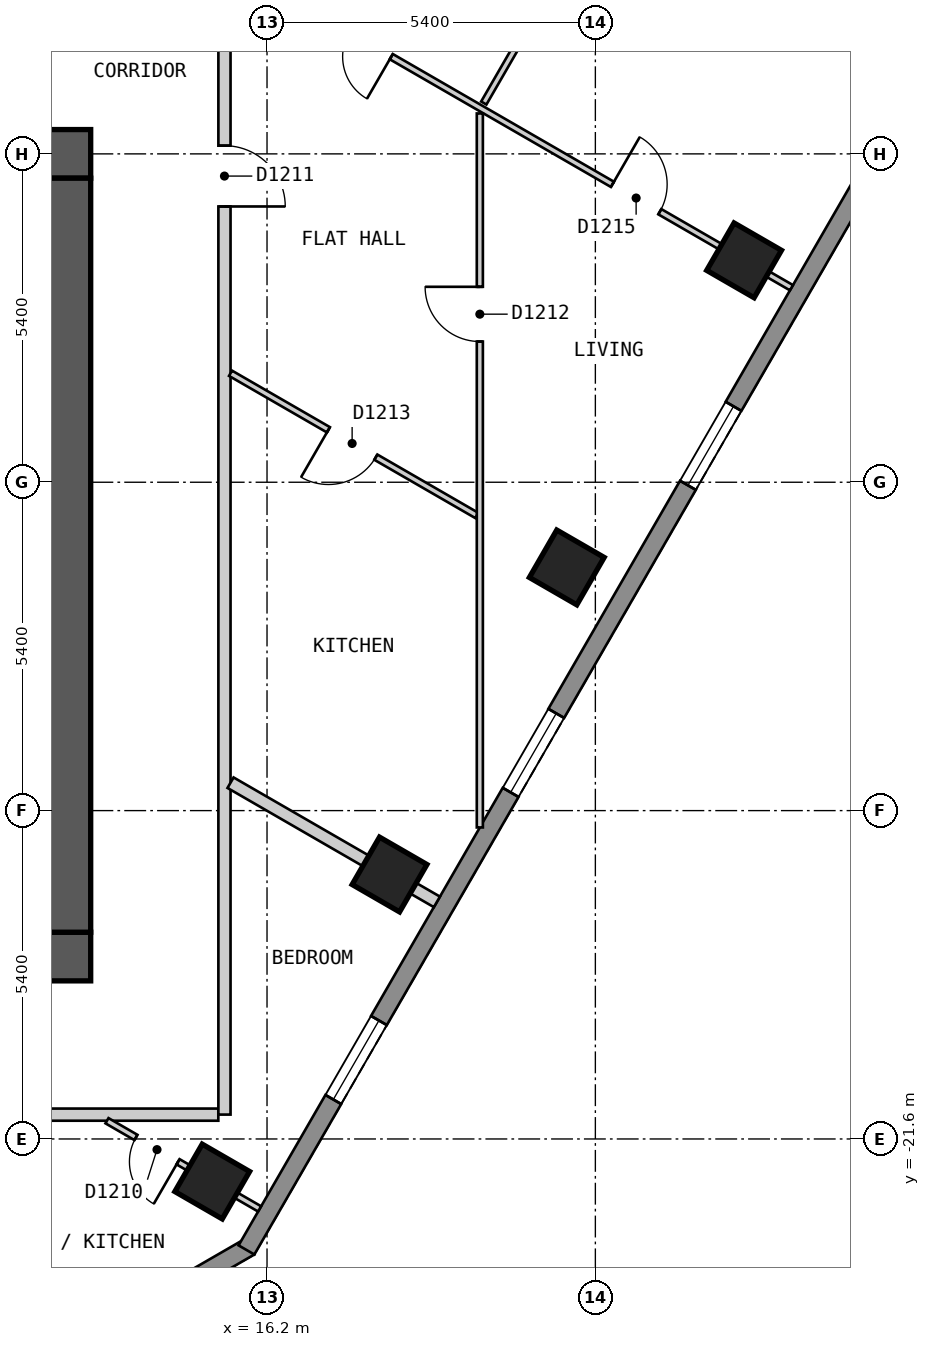
"""IFC4 building model, lengths in metres.
Left out: names, types, materials, properties, quantities, classifications, styles, units other than length and angle.
Written with IfcOpenShell. Run it as: python <this file> out.ifc"""

import sys

from ifc_helpers import new_model, si_unit, direction, frame, frame_2d, origin, origin_2d, place, context, subcontext, project, spatial, polyline, rectangle, outline, extrude, element, fill, save


model = new_model("IFC4")
c1 = context("Model", 3, precision=1e-05, world=origin(), true_north=direction((0.0, 1.0)))
c2 = subcontext(c1, "Body", "Model", "MODEL_VIEW")
j1 = project(units=[si_unit("LENGTHUNIT", "METRE"), si_unit("PLANEANGLEUNIT", "RADIAN")], contexts=[c1])
p1 = place(None, origin())
s1 = spatial("IfcSite", under=j1, at=p1, CompositionType="ELEMENT")
p2 = place(p1, origin())
s2 = spatial("IfcBuilding", under=s1, at=p2, CompositionType="ELEMENT")
p3 = place(p2, frame((0.0, 0.0, 129.6)))
s3 = spatial("IfcBuildingStorey", under=s2, at=p3, CompositionType="ELEMENT", Elevation=129.6)
for number, where, z_axis, x_axis in (
    (1, (15.299, -22.3, 0.0), (0.0, 0.0, 1.0), (0.5, 0.866, 0.0)),
    (2, (18.215, -17.251, 0.0), (0.0, 0.0, 1.0), (0.5, 0.866, 0.0)),
    (3, (21.13, -12.201, 0.0), (0.0, 0.0, 1.0), (0.5, 0.866, 0.0)),
    (4, (24.046, -7.151, 0.0), (0.0, 0.0, 1.0), (0.5, 0.866, 0.0)),
):
    element("IfcColumn", number, at=place(p3, frame(where, z_axis=z_axis, x_axis=x_axis)), inside=s3, PredefinedType="COLUMN", context=c2, shape_type="SweptSolid", body=[
        extrude(rectangle(XDim=0.9, YDim=0.9, at=origin_2d()), origin(), (0.0, 0.0, 1.0), 3.0),
    ])
p4 = place(p3, frame((-13.3, -18.6, 0.0), z_axis=(0.0, 0.0, 1.0), x_axis=(1.0, 0.0, 0.0)))
e5 = element("IfcWall", 5, at=p4, inside=s3, PredefinedType="SHEAR", context=c2, shape_type="SweptSolid", body=[
    extrude(rectangle(XDim=26.6, YDim=0.8, at=frame_2d((13.3, 0.0))), origin(), (0.0, 0.0, 1.0), 2.7),
])
p5 = place(p3, frame((-13.3, -5.4, 0.0), z_axis=(0.0, 0.0, 1.0), x_axis=(1.0, 0.0, 0.0)))
e6 = element("IfcWall", 6, at=p5, inside=s3, PredefinedType="SHEAR", context=c2, shape_type="SweptSolid", body=[
    extrude(rectangle(XDim=26.6, YDim=0.8, at=frame_2d((13.3, 0.0))), origin(), (0.0, 0.0, 1.0), 2.7),
])
p6 = place(p5, frame((23.65, 0.0, 0.0)))
e7 = element("IfcOpeningElement", 7, at=p6, cuts=e6, PredefinedType="OPENING", context=c2, shape_type="SweptSolid", body=[
    extrude(rectangle(XDim=1.2, YDim=2.1, at=frame_2d((0.6, 1.05))), frame((0.0, 0.41, 0.0), z_axis=(0.0, -1.0, 0.0), x_axis=(1.0, 0.0, 0.0)), (0.0, 0.0, 1.0), 0.82),
])
p7 = place(p3, frame((12.9, -18.2, 0.0), z_axis=(0.0, 0.0, 1.0), x_axis=(0.0, 1.0, 0.0)))
e8 = element("IfcWall", 8, at=p7, inside=s3, PredefinedType="SHEAR", context=c2, shape_type="SweptSolid", body=[
    extrude(rectangle(XDim=12.4, YDim=0.8, at=frame_2d((6.2, 0.0))), origin(), (0.0, 0.0, 1.0), 2.7),
])
p8 = place(p3, frame((11.587, -25.87, 0.0), z_axis=(0.0, 0.0, 1.0), x_axis=(0.866022959057, 0.500004234368, 0.0)))
e9 = element("IfcWall", 9, at=p8, inside=s3, PredefinedType="SOLIDWALL", context=c2, shape_type="SweptSolid", body=[
    extrude(outline(polyline([(0.0, -0.15), (5.0, -0.15), (4.92, 0.15), (0.08, 0.15), (0.0, -0.15)])), origin(), (0.0, 0.0, 1.0), 2.7),
])
p9 = place(p8, frame((0.65, 0.0, 0.15)))
e10 = element("IfcOpeningElement", 10, at=p9, cuts=e9, PredefinedType="OPENING", context=c2, shape_type="SweptSolid", body=[
    extrude(rectangle(XDim=1.2, YDim=2.1, at=frame_2d((0.6, 1.05))), frame((0.0, 0.16, 0.0), z_axis=(0.0, -1.0, 0.0), x_axis=(1.0, 0.0, 0.0)), (0.0, 0.0, 1.0), 0.32),
])
p10 = place(p3, frame((15.862, -23.425, 0.0), z_axis=(0.0, 0.0, 1.0), x_axis=(0.500017503135, 0.866015298109, 0.0)))
e11 = element("IfcWall", 11, at=p10, inside=s3, PredefinedType="SOLIDWALL", context=c2, shape_type="SweptSolid", body=[
    extrude(outline(polyline([(0.0, -0.15), (24.711, -0.15), (24.631, 0.15), (0.08, 0.15), (0.0, -0.15)])), origin(), (0.0, 0.0, 1.0), 2.7),
])
p11 = place(p10, frame((2.857, 0.0, 0.15)))
e12 = element("IfcOpeningElement", 12, at=p11, cuts=e11, PredefinedType="OPENING", context=c2, shape_type="SweptSolid", body=[
    extrude(rectangle(XDim=1.5, YDim=2.1, at=frame_2d((0.75, 1.05))), frame((0.0, 0.16, 0.0), z_axis=(0.0, -1.0, 0.0), x_axis=(1.0, 0.0, 0.0)), (0.0, 0.0, 1.0), 0.32),
])
p12 = place(p10, frame((8.689, 0.0, 0.15)))
e13 = element("IfcOpeningElement", 13, at=p12, cuts=e11, PredefinedType="OPENING", context=c2, shape_type="SweptSolid", body=[
    extrude(rectangle(XDim=1.5, YDim=2.1, at=frame_2d((0.75, 1.05))), frame((0.0, 0.16, 0.0), z_axis=(0.0, -1.0, 0.0), x_axis=(1.0, 0.0, 0.0)), (0.0, 0.0, 1.0), 0.32),
])
p13 = place(p10, frame((14.52, 0.0, 0.15)))
e14 = element("IfcOpeningElement", 14, at=p13, cuts=e11, PredefinedType="OPENING", context=c2, shape_type="SweptSolid", body=[
    extrude(rectangle(XDim=1.5, YDim=2.1, at=frame_2d((0.75, 1.05))), frame((0.0, 0.16, 0.0), z_axis=(0.0, -1.0, 0.0), x_axis=(1.0, 0.0, 0.0)), (0.0, 0.0, 1.0), 0.32),
])
p14 = place(p10, frame((20.351, 0.0, 0.15)))
e15 = element("IfcOpeningElement", 15, at=p14, cuts=e11, PredefinedType="OPENING", context=c2, shape_type="SweptSolid", body=[
    extrude(rectangle(XDim=1.5, YDim=2.1, at=frame_2d((0.75, 1.05))), frame((0.0, 0.16, 0.0), z_axis=(0.0, -1.0, 0.0), x_axis=(1.0, 0.0, 0.0)), (0.0, 0.0, 1.0), 0.32),
])
p15 = place(p3, frame((-15.499, -21.2, 0.0), z_axis=(0.0, 0.0, 1.0), x_axis=(1.0, 0.0, 0.0)))
e16 = element("IfcWall", 16, at=p15, inside=s3, PredefinedType="PARTITIONING", context=c2, shape_type="SweptSolid", body=[
    extrude(rectangle(XDim=30.898, YDim=0.2, at=frame_2d((15.449, 0.0))), origin(), (0.0, 0.0, 1.0), 2.7),
])
p16 = place(p15, frame((12.258, 0.0, 0.0)))
e17 = element("IfcOpeningElement", 17, at=p16, cuts=e16, PredefinedType="OPENING", context=c2, shape_type="SweptSolid", body=[
    extrude(rectangle(XDim=1.0, YDim=2.1, at=frame_2d((0.5, 1.05))), frame((0.0, 0.11, 0.0), z_axis=(0.0, -1.0, 0.0), x_axis=(1.0, 0.0, 0.0)), (0.0, 0.0, 1.0), 0.22),
])
p17 = place(p15, frame((23.228, 0.0, 0.0)))
e18 = element("IfcOpeningElement", 18, at=p17, cuts=e16, PredefinedType="OPENING", context=c2, shape_type="SweptSolid", body=[
    extrude(rectangle(XDim=1.0, YDim=2.1, at=frame_2d((0.5, 1.05))), frame((0.0, 0.11, 0.0), z_axis=(0.0, -1.0, 0.0), x_axis=(1.0, 0.0, 0.0)), (0.0, 0.0, 1.0), 0.22),
])
p18 = place(p3, frame((15.5, -21.199, 0.0), z_axis=(0.0, 0.0, 1.0), x_axis=(0.0, 1.0, 0.0)))
e19 = element("IfcWall", 19, at=p18, inside=s3, PredefinedType="PARTITIONING", context=c2, shape_type="SweptSolid", body=[
    extrude(rectangle(XDim=17.647, YDim=0.2, at=frame_2d((8.823, 0.0))), origin(), (0.0, 0.0, 1.0), 2.7),
])
p19 = place(p18, frame((14.934, 0.0, 0.0)))
e20 = element("IfcOpeningElement", 20, at=p19, cuts=e19, PredefinedType="OPENING", context=c2, shape_type="SweptSolid", body=[
    extrude(rectangle(XDim=1.0, YDim=2.1, at=frame_2d((0.5, 1.05))), frame((0.0, 0.11, 0.0), z_axis=(0.0, -1.0, 0.0), x_axis=(1.0, 0.0, 0.0)), (0.0, 0.0, 1.0), 0.22),
])
p20 = place(p3, frame((13.568, -21.3, 0.0), z_axis=(0.0, 0.0, 1.0), x_axis=(0.865885342641, -0.500242514586, 0.0)))
e21 = element("IfcWall", 21, at=p20, inside=s3, PredefinedType="PARTITIONING", context=c2, shape_type="SweptSolid", body=[
    extrude(rectangle(XDim=2.898, YDim=0.1, at=frame_2d((1.449, 0.0))), origin(), (0.0, 0.0, 1.0), 2.7),
])
p21 = place(p20, frame((0.55, 0.0, 0.0)))
e22 = element("IfcOpeningElement", 22, at=p21, cuts=e21, PredefinedType="OPENING", context=c2, shape_type="SweptSolid", body=[
    extrude(rectangle(XDim=0.8, YDim=2.1, at=frame_2d((0.4, 1.05))), frame((0.0, 0.06, 0.0), z_axis=(0.0, -1.0, 0.0), x_axis=(1.0, 0.0, 0.0)), (0.0, 0.0, 1.0), 0.12),
])
p22 = place(p3, frame((15.6, -9.008, 0.0), z_axis=(0.0, 0.0, 1.0), x_axis=(0.866049960314, -0.49995746443, 0.0)))
e23 = element("IfcWall", 23, at=p22, inside=s3, PredefinedType="PARTITIONING", context=c2, shape_type="SweptSolid", body=[
    extrude(rectangle(XDim=4.676, YDim=0.1, at=frame_2d((2.338, 0.0))), origin(), (0.0, 0.0, 1.0), 2.7),
])
p23 = place(p22, frame((1.859, 0.0, 0.0)))
e24 = element("IfcOpeningElement", 24, at=p23, cuts=e23, PredefinedType="OPENING", context=c2, shape_type="SweptSolid", body=[
    extrude(rectangle(XDim=0.9, YDim=2.1, at=frame_2d((0.45, 1.05))), frame((0.0, 0.06, 0.0), z_axis=(0.0, -1.0, 0.0), x_axis=(1.0, 0.0, 0.0)), (0.0, 0.0, 1.0), 0.12),
])
p24 = place(p3, frame((16.165, -2.601, 0.0), z_axis=(0.0, 0.0, 1.0), x_axis=(0.866016855193, -0.500014806302, 0.0)))
e25 = element("IfcWall", 25, at=p24, inside=s3, PredefinedType="PARTITIONING", context=c2, shape_type="SweptSolid", body=[
    extrude(rectangle(XDim=10.0, YDim=0.1, at=frame_2d((5.0, 0.0))), origin(), (0.0, 0.0, 1.0), 2.7),
])
p25 = place(p24, frame((1.6, 0.0, 0.0)))
e26 = element("IfcOpeningElement", 26, at=p25, cuts=e25, PredefinedType="OPENING", context=c2, shape_type="SweptSolid", body=[
    extrude(rectangle(XDim=0.8, YDim=2.1, at=frame_2d((0.4, 1.05))), frame((0.0, 0.06, 0.0), z_axis=(0.0, -1.0, 0.0), x_axis=(1.0, 0.0, 0.0)), (0.0, 0.0, 1.0), 0.12),
])
p26 = place(p24, frame((6.6, 0.0, 0.0)))
e27 = element("IfcOpeningElement", 27, at=p26, cuts=e25, PredefinedType="OPENING", context=c2, shape_type="SweptSolid", body=[
    extrude(rectangle(XDim=0.9, YDim=2.1, at=frame_2d((0.45, 1.05))), frame((0.0, 0.06, 0.0), z_axis=(0.0, -1.0, 0.0), x_axis=(1.0, 0.0, 0.0)), (0.0, 0.0, 1.0), 0.12),
])
p27 = place(p3, frame((19.765, -4.564, 0.0), z_axis=(0.0, 0.0, 1.0), x_axis=(0.500060182325, 0.865990654714, 0.0)))
e28 = element("IfcWall", 28, at=p27, inside=s3, PredefinedType="PARTITIONING", context=c2, shape_type="SweptSolid", body=[
    extrude(rectangle(XDim=5.632, YDim=0.1, at=frame_2d((2.816, 0.0))), origin(), (0.0, 0.0, 1.0), 2.7),
])
p28 = place(p3, frame((19.7, -16.477, 0.0), z_axis=(0.0, 0.0, 1.0), x_axis=(0.0, 1.0, 0.0)))
e29 = element("IfcWall", 29, at=p28, inside=s3, PredefinedType="PARTITIONING", context=c2, shape_type="SweptSolid", body=[
    extrude(rectangle(XDim=11.742, YDim=0.1, at=frame_2d((5.871, 0.0))), origin(), (0.0, 0.0, 1.0), 2.7),
])
p29 = place(p28, frame((7.991, 0.0, 0.0)))
e30 = element("IfcOpeningElement", 30, at=p29, cuts=e29, PredefinedType="OPENING", context=c2, shape_type="SweptSolid", body=[
    extrude(rectangle(XDim=0.9, YDim=2.1, at=frame_2d((0.45, 1.05))), frame((0.0, 0.06, 0.0), z_axis=(0.0, -1.0, 0.0), x_axis=(1.0, 0.0, 0.0)), (0.0, 0.0, 1.0), 0.12),
])
p30 = place(p3, frame((15.6, -15.741, 0.0), z_axis=(0.0, 0.0, 1.0), x_axis=(0.865964599155, -0.500105301922, 0.0)))
e31 = element("IfcWall", 31, at=p30, inside=s3, PredefinedType="PARTITIONING", context=c2, shape_type="SweptSolid", body=[
    extrude(rectangle(XDim=3.919, YDim=0.2, at=frame_2d((1.959, 0.0))), origin(), (0.0, 0.0, 1.0), 2.7),
])
p31 = place(p11, origin())
e32 = element("IfcWindow", 32, at=p31, inside=s3, PartitioningType="SINGLE_PANEL", PredefinedType="WINDOW", context=c2, shape_type="SweptSolid", body=[
    extrude(rectangle(XDim=1.5, YDim=2.1, at=frame_2d((0.75, 1.05))), frame((0.0, 0.03, 0.0), z_axis=(0.0, -1.0, 0.0), x_axis=(1.0, 0.0, 0.0)), (0.0, 0.0, 1.0), 0.06),
])
fill(e12, e32)
p32 = place(p12, origin())
e33 = element("IfcWindow", 33, at=p32, inside=s3, PartitioningType="SINGLE_PANEL", PredefinedType="WINDOW", context=c2, shape_type="SweptSolid", body=[
    extrude(rectangle(XDim=1.5, YDim=2.1, at=frame_2d((0.75, 1.05))), frame((0.0, 0.03, 0.0), z_axis=(0.0, -1.0, 0.0), x_axis=(1.0, 0.0, 0.0)), (0.0, 0.0, 1.0), 0.06),
])
fill(e13, e33)
p33 = place(p13, origin())
e34 = element("IfcWindow", 34, at=p33, inside=s3, PartitioningType="SINGLE_PANEL", PredefinedType="WINDOW", context=c2, shape_type="SweptSolid", body=[
    extrude(rectangle(XDim=1.5, YDim=2.1, at=frame_2d((0.75, 1.05))), frame((0.0, 0.03, 0.0), z_axis=(0.0, -1.0, 0.0), x_axis=(1.0, 0.0, 0.0)), (0.0, 0.0, 1.0), 0.06),
])
fill(e14, e34)
p34 = place(p21, origin())
e35 = element("IfcDoor", 35, at=p34, inside=s3, OperationType="SINGLE_SWING_RIGHT", PredefinedType="DOOR", context=c2, shape_type="SweptSolid", body=[
    extrude(rectangle(XDim=0.8, YDim=2.1, at=frame_2d((0.4, 1.05))), frame((0.0, 0.025, 0.0), z_axis=(0.0, -1.0, 0.0), x_axis=(1.0, 0.0, 0.0)), (0.0, 0.0, 1.0), 0.05),
])
fill(e22, e35)
p35 = place(p19, origin())
e36 = element("IfcDoor", 36, at=p35, inside=s3, OperationType="SINGLE_SWING_LEFT", PredefinedType="DOOR", context=c2, shape_type="SweptSolid", body=[
    extrude(rectangle(XDim=1.0, YDim=2.1, at=frame_2d((0.5, 1.05))), frame((0.0, 0.025, 0.0), z_axis=(0.0, -1.0, 0.0), x_axis=(1.0, 0.0, 0.0)), (0.0, 0.0, 1.0), 0.05),
])
fill(e20, e36)
p36 = place(p29, origin())
e37 = element("IfcDoor", 37, at=p36, inside=s3, OperationType="SINGLE_SWING_RIGHT", PredefinedType="DOOR", context=c2, shape_type="SweptSolid", body=[
    extrude(rectangle(XDim=0.9, YDim=2.1, at=frame_2d((0.45, 1.05))), frame((0.0, 0.025, 0.0), z_axis=(0.0, -1.0, 0.0), x_axis=(1.0, 0.0, 0.0)), (0.0, 0.0, 1.0), 0.05),
])
fill(e30, e37)
p37 = place(p23, origin())
e38 = element("IfcDoor", 38, at=p37, inside=s3, OperationType="SINGLE_SWING_LEFT", PredefinedType="DOOR", context=c2, shape_type="SweptSolid", body=[
    extrude(rectangle(XDim=0.9, YDim=2.1, at=frame_2d((0.45, 1.05))), frame((0.0, 0.025, 0.0), z_axis=(0.0, -1.0, 0.0), x_axis=(1.0, 0.0, 0.0)), (0.0, 0.0, 1.0), 0.05),
])
fill(e24, e38)
p38 = place(p25, origin())
e39 = element("IfcDoor", 39, at=p38, inside=s3, OperationType="SINGLE_SWING_RIGHT", PredefinedType="DOOR", context=c2, shape_type="SweptSolid", body=[
    extrude(rectangle(XDim=0.8, YDim=2.1, at=frame_2d((0.4, 1.05))), frame((0.0, 0.025, 0.0), z_axis=(0.0, -1.0, 0.0), x_axis=(1.0, 0.0, 0.0)), (0.0, 0.0, 1.0), 0.05),
])
fill(e26, e39)
p39 = place(p26, origin())
e40 = element("IfcDoor", 40, at=p39, inside=s3, OperationType="SINGLE_SWING_LEFT", PredefinedType="DOOR", context=c2, shape_type="SweptSolid", body=[
    extrude(rectangle(XDim=0.9, YDim=2.1, at=frame_2d((0.45, 1.05))), frame((0.0, 0.025, 0.0), z_axis=(0.0, -1.0, 0.0), x_axis=(1.0, 0.0, 0.0)), (0.0, 0.0, 1.0), 0.05),
])
fill(e27, e40)
save(model, sys.argv[1])
